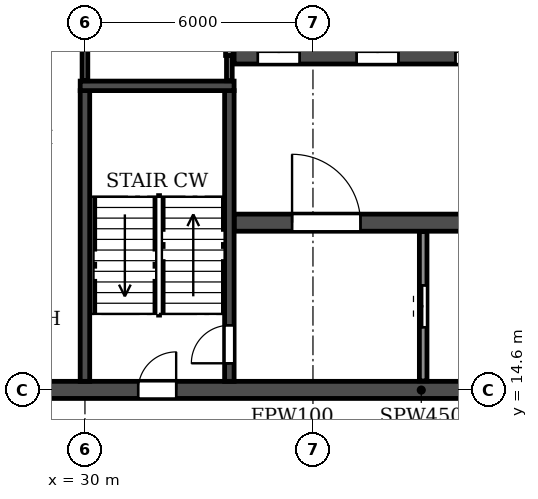
"""IFC4 building model, lengths in metres.
Left out: names, types, materials, properties, quantities, classifications, styles, units other than length and angle.
Written with IfcOpenShell. Run it as: python <this file> out.ifc"""

import sys

from ifc_helpers import new_model, si_unit, direction, frame, frame_2d, origin, place, context, subcontext, project, spatial, rectangle, extrude, element, fill, save


model = new_model("IFC4")
c1 = context("Model", 3, precision=1e-05, world=origin(), true_north=direction((0.0, 1.0)))
c2 = subcontext(c1, "Body", "Model", "MODEL_VIEW")
j1 = project(units=[si_unit("LENGTHUNIT", "METRE"), si_unit("PLANEANGLEUNIT", "RADIAN")], contexts=[c1])
p1 = place(None, origin())
s1 = spatial("IfcSite", under=j1, at=p1, CompositionType="ELEMENT")
p2 = place(p1, origin())
s2 = spatial("IfcBuilding", under=s1, at=p2, CompositionType="ELEMENT")
p3 = place(p2, frame((0.0, 0.0, 162.0)))
s3 = spatial("IfcBuildingStorey", under=s2, at=p3, CompositionType="ELEMENT", Elevation=162.0)
p4 = place(p3, frame((18.2, 14.6, 0.0), z_axis=(0.0, 0.0, 1.0), x_axis=(1.0, 0.0, 0.0)))
e1 = element("IfcWall", 1, at=p4, inside=s3, PredefinedType="SOLIDWALL", context=c2, shape_type="SweptSolid", body=[
    extrude(rectangle(XDim=65.6, YDim=0.45, at=frame_2d((32.8, 0.0))), origin(), (0.0, 0.0, 1.0), 2.95),
])
p5 = place(p4, frame((0.7, 0.0, 0.0)))
e2 = element("IfcOpeningElement", 2, at=p5, cuts=e1, PredefinedType="OPENING", context=c2, shape_type="SweptSolid", body=[
    extrude(rectangle(XDim=1.0, YDim=2.1, at=frame_2d((0.5, 1.05))), frame((0.0, 0.235, 0.0), z_axis=(0.0, -1.0, 0.0), x_axis=(1.0, 0.0, 0.0)), (0.0, 0.0, 1.0), 0.47),
])
p6 = place(p4, frame((8.6, 0.0, 0.0)))
e3 = element("IfcOpeningElement", 3, at=p6, cuts=e1, PredefinedType="OPENING", context=c2, shape_type="SweptSolid", body=[
    extrude(rectangle(XDim=1.0, YDim=2.1, at=frame_2d((0.5, 1.05))), frame((0.0, 0.235, 0.0), z_axis=(0.0, -1.0, 0.0), x_axis=(1.0, 0.0, 0.0)), (0.0, 0.0, 1.0), 0.47),
])
p7 = place(p4, frame((13.2, 0.0, 0.0)))
e4 = element("IfcOpeningElement", 4, at=p7, cuts=e1, PredefinedType="OPENING", context=c2, shape_type="SweptSolid", body=[
    extrude(rectangle(XDim=1.0, YDim=2.1, at=frame_2d((0.5, 1.05))), frame((0.0, 0.235, 0.0), z_axis=(0.0, -1.0, 0.0), x_axis=(1.0, 0.0, 0.0)), (0.0, 0.0, 1.0), 0.47),
])
p8 = place(p4, frame((27.1, 0.0, 0.0)))
e5 = element("IfcOpeningElement", 5, at=p8, cuts=e1, PredefinedType="OPENING", context=c2, shape_type="SweptSolid", body=[
    extrude(rectangle(XDim=1.0, YDim=2.1, at=frame_2d((0.5, 1.05))), frame((0.0, 0.235, 0.0), z_axis=(0.0, -1.0, 0.0), x_axis=(1.0, 0.0, 0.0)), (0.0, 0.0, 1.0), 0.47),
])
p9 = place(p4, frame((32.3, 0.0, 0.0)))
e6 = element("IfcOpeningElement", 6, at=p9, cuts=e1, PredefinedType="OPENING", context=c2, shape_type="SweptSolid", body=[
    extrude(rectangle(XDim=1.0, YDim=2.1, at=frame_2d((0.5, 1.05))), frame((0.0, 0.235, 0.0), z_axis=(0.0, -1.0, 0.0), x_axis=(1.0, 0.0, 0.0)), (0.0, 0.0, 1.0), 0.47),
])
p10 = place(p4, frame((35.95, 0.0, 0.0)))
e7 = element("IfcOpeningElement", 7, at=p10, cuts=e1, PredefinedType="OPENING", context=c2, shape_type="SweptSolid", body=[
    extrude(rectangle(XDim=1.5, YDim=2.1, at=frame_2d((0.75, 1.05))), frame((0.0, 0.235, 0.0), z_axis=(0.0, -1.0, 0.0), x_axis=(1.0, 0.0, 0.0)), (0.0, 0.0, 1.0), 0.47),
])
p11 = place(p4, frame((40.1, 0.0, 0.0)))
e8 = element("IfcOpeningElement", 8, at=p11, cuts=e1, PredefinedType="OPENING", context=c2, shape_type="SweptSolid", body=[
    extrude(rectangle(XDim=1.0, YDim=2.1, at=frame_2d((0.5, 1.05))), frame((0.0, 0.235, 0.0), z_axis=(0.0, -1.0, 0.0), x_axis=(1.0, 0.0, 0.0)), (0.0, 0.0, 1.0), 0.47),
])
p12 = place(p4, frame((51.4, 0.0, 0.0)))
e9 = element("IfcOpeningElement", 9, at=p12, cuts=e1, PredefinedType="OPENING", context=c2, shape_type="SweptSolid", body=[
    extrude(rectangle(XDim=1.0, YDim=2.1, at=frame_2d((0.5, 1.05))), frame((0.0, 0.235, 0.0), z_axis=(0.0, -1.0, 0.0), x_axis=(1.0, 0.0, 0.0)), (0.0, 0.0, 1.0), 0.47),
])
p13 = place(p4, frame((56.0, 0.0, 0.0)))
e10 = element("IfcOpeningElement", 10, at=p13, cuts=e1, PredefinedType="OPENING", context=c2, shape_type="SweptSolid", body=[
    extrude(rectangle(XDim=1.0, YDim=2.1, at=frame_2d((0.5, 1.05))), frame((0.0, 0.235, 0.0), z_axis=(0.0, -1.0, 0.0), x_axis=(1.0, 0.0, 0.0)), (0.0, 0.0, 1.0), 0.47),
])
p14 = place(p4, frame((63.9, 0.0, 0.0)))
e11 = element("IfcOpeningElement", 11, at=p14, cuts=e1, PredefinedType="OPENING", context=c2, shape_type="SweptSolid", body=[
    extrude(rectangle(XDim=1.0, YDim=2.1, at=frame_2d((0.5, 1.05))), frame((0.0, 0.235, 0.0), z_axis=(0.0, -1.0, 0.0), x_axis=(1.0, 0.0, 0.0)), (0.0, 0.0, 1.0), 0.47),
])
p15 = place(p3, frame((33.925, 19.0, 0.0), z_axis=(0.0, 0.0, 1.0), x_axis=(1.0, 0.0, 0.0)))
e12 = element("IfcWall", 12, at=p15, inside=s3, PredefinedType="SOLIDWALL", context=c2, shape_type="SweptSolid", body=[
    extrude(rectangle(XDim=34.15, YDim=0.45, at=frame_2d((17.075, 0.0))), origin(), (0.0, 0.0, 1.0), 2.95),
])
p16 = place(p15, frame((16.175, 0.0, 0.0)))
e13 = element("IfcOpeningElement", 13, at=p16, cuts=e12, PredefinedType="OPENING", context=c2, shape_type="SweptSolid", body=[
    extrude(rectangle(XDim=1.8, YDim=2.1, at=frame_2d((0.9, 1.05))), frame((0.0, 0.235, 0.0), z_axis=(0.0, -1.0, 0.0), x_axis=(1.0, 0.0, 0.0)), (0.0, 0.0, 1.0), 0.47),
])
p17 = place(p15, frame((1.525, 0.0, 0.0)))
e14 = element("IfcOpeningElement", 14, at=p17, cuts=e12, PredefinedType="OPENING", context=c2, shape_type="SweptSolid", body=[
    extrude(rectangle(XDim=1.8, YDim=2.1, at=frame_2d((0.9, 1.05))), frame((0.0, 0.235, 0.0), z_axis=(0.0, -1.0, 0.0), x_axis=(1.0, 0.0, 0.0)), (0.0, 0.0, 1.0), 0.47),
])
p18 = place(p15, frame((30.825, 0.0, 0.0)))
e15 = element("IfcOpeningElement", 15, at=p18, cuts=e12, PredefinedType="OPENING", context=c2, shape_type="SweptSolid", body=[
    extrude(rectangle(XDim=1.8, YDim=2.1, at=frame_2d((0.9, 1.05))), frame((0.0, 0.235, 0.0), z_axis=(0.0, -1.0, 0.0), x_axis=(1.0, 0.0, 0.0)), (0.0, 0.0, 1.0), 0.47),
])
p19 = place(p3, frame((33.925, 23.4, 0.0), z_axis=(0.0, 0.0, 1.0), x_axis=(1.0, 0.0, 0.0)))
e16 = element("IfcWall", 16, at=p19, inside=s3, PredefinedType="SOLIDWALL", context=c2, shape_type="SweptSolid", body=[
    extrude(rectangle(XDim=34.15, YDim=0.45, at=frame_2d((17.075, 0.0))), origin(), (0.0, 0.0, 1.0), 2.95),
])
p20 = place(p19, frame((16.175, 0.0, 0.0)))
e17 = element("IfcOpeningElement", 17, at=p20, cuts=e16, PredefinedType="OPENING", context=c2, shape_type="SweptSolid", body=[
    extrude(rectangle(XDim=1.8, YDim=2.1, at=frame_2d((0.9, 1.05))), frame((0.0, 0.235, 0.0), z_axis=(0.0, -1.0, 0.0), x_axis=(1.0, 0.0, 0.0)), (0.0, 0.0, 1.0), 0.47),
])
p21 = place(p19, frame((0.625, 0.0, 0.0)))
e18 = element("IfcOpeningElement", 18, at=p21, cuts=e16, PredefinedType="OPENING", context=c2, shape_type="SweptSolid", body=[
    extrude(rectangle(XDim=1.1, YDim=2.1, at=frame_2d((0.55, 1.05))), frame((0.0, 0.235, 0.0), z_axis=(0.0, -1.0, 0.0), x_axis=(1.0, 0.0, 0.0)), (0.0, 0.0, 1.0), 0.47),
])
p22 = place(p19, frame((3.225, 0.0, 0.0)))
e19 = element("IfcOpeningElement", 19, at=p22, cuts=e16, PredefinedType="OPENING", context=c2, shape_type="SweptSolid", body=[
    extrude(rectangle(XDim=1.1, YDim=2.1, at=frame_2d((0.55, 1.05))), frame((0.0, 0.235, 0.0), z_axis=(0.0, -1.0, 0.0), x_axis=(1.0, 0.0, 0.0)), (0.0, 0.0, 1.0), 0.47),
])
p23 = place(p19, frame((5.825, 0.0, 0.0)))
e20 = element("IfcOpeningElement", 20, at=p23, cuts=e16, PredefinedType="OPENING", context=c2, shape_type="SweptSolid", body=[
    extrude(rectangle(XDim=1.1, YDim=2.1, at=frame_2d((0.55, 1.05))), frame((0.0, 0.235, 0.0), z_axis=(0.0, -1.0, 0.0), x_axis=(1.0, 0.0, 0.0)), (0.0, 0.0, 1.0), 0.47),
])
p24 = place(p19, frame((8.425, 0.0, 0.0)))
e21 = element("IfcOpeningElement", 21, at=p24, cuts=e16, PredefinedType="OPENING", context=c2, shape_type="SweptSolid", body=[
    extrude(rectangle(XDim=1.1, YDim=2.1, at=frame_2d((0.55, 1.05))), frame((0.0, 0.235, 0.0), z_axis=(0.0, -1.0, 0.0), x_axis=(1.0, 0.0, 0.0)), (0.0, 0.0, 1.0), 0.47),
])
p25 = place(p19, frame((11.025, 0.0, 0.0)))
e22 = element("IfcOpeningElement", 22, at=p25, cuts=e16, PredefinedType="OPENING", context=c2, shape_type="SweptSolid", body=[
    extrude(rectangle(XDim=1.1, YDim=2.1, at=frame_2d((0.55, 1.05))), frame((0.0, 0.235, 0.0), z_axis=(0.0, -1.0, 0.0), x_axis=(1.0, 0.0, 0.0)), (0.0, 0.0, 1.0), 0.47),
])
p26 = place(p19, frame((13.625, 0.0, 0.0)))
e23 = element("IfcOpeningElement", 23, at=p26, cuts=e16, PredefinedType="OPENING", context=c2, shape_type="SweptSolid", body=[
    extrude(rectangle(XDim=1.1, YDim=2.1, at=frame_2d((0.55, 1.05))), frame((0.0, 0.235, 0.0), z_axis=(0.0, -1.0, 0.0), x_axis=(1.0, 0.0, 0.0)), (0.0, 0.0, 1.0), 0.47),
])
p27 = place(p19, frame((27.225, 0.0, 0.0)))
e24 = element("IfcOpeningElement", 24, at=p27, cuts=e16, PredefinedType="OPENING", context=c2, shape_type="SweptSolid", body=[
    extrude(rectangle(XDim=1.1, YDim=2.1, at=frame_2d((0.55, 1.05))), frame((0.0, 0.235, 0.0), z_axis=(0.0, -1.0, 0.0), x_axis=(1.0, 0.0, 0.0)), (0.0, 0.0, 1.0), 0.47),
])
p28 = place(p3, frame((30.0, 14.825, 0.0), z_axis=(0.0, 0.0, 1.0), x_axis=(0.0, 1.0, 0.0)))
e25 = element("IfcWall", 25, at=p28, inside=s3, PredefinedType="SOLIDWALL", context=c2, shape_type="SweptSolid", body=[
    extrude(rectangle(XDim=7.65, YDim=0.25, at=frame_2d((3.825, 0.0))), origin(), (0.0, 0.0, 1.0), 2.95),
])
p29 = place(p3, frame((33.8, 14.825, 0.0), z_axis=(0.0, 0.0, 1.0), x_axis=(0.0, 1.0, 0.0)))
e26 = element("IfcWall", 26, at=p29, inside=s3, PredefinedType="SOLIDWALL", context=c2, shape_type="SweptSolid", body=[
    extrude(rectangle(XDim=7.65, YDim=0.25, at=frame_2d((3.825, 0.0))), origin(), (0.0, 0.0, 1.0), 2.95),
])
p30 = place(p29, frame((0.475, 0.0, 0.0)))
e27 = element("IfcOpeningElement", 27, at=p30, cuts=e26, PredefinedType="OPENING", context=c2, shape_type="SweptSolid", body=[
    extrude(rectangle(XDim=1.0, YDim=2.1, at=frame_2d((0.5, 1.05))), frame((0.0, 0.135, 0.0), z_axis=(0.0, -1.0, 0.0), x_axis=(1.0, 0.0, 0.0)), (0.0, 0.0, 1.0), 0.27),
])
p31 = place(p3, frame((29.875, 22.6, 0.0), z_axis=(0.0, 0.0, 1.0), x_axis=(1.0, 0.0, 0.0)))
e28 = element("IfcWall", 28, at=p31, inside=s3, PredefinedType="SOLIDWALL", context=c2, shape_type="SweptSolid", body=[
    extrude(rectangle(XDim=4.05, YDim=0.25, at=frame_2d((2.025, 0.0))), origin(), (0.0, 0.0, 1.0), 2.95),
])
p32 = place(p3, frame((30.0, 22.735, 0.0), z_axis=(0.0, 0.0, 1.0), x_axis=(0.0, 1.0, 0.0)))
e29 = element("IfcWall", 29, at=p32, inside=s3, PredefinedType="PARTITIONING", context=c2, shape_type="SweptSolid", body=[
    extrude(rectangle(XDim=4.83, YDim=0.15, at=frame_2d((2.415, 0.0))), origin(), (0.0, 0.0, 1.0), 2.95),
])
p33 = place(p3, frame((33.8, 22.735, 0.0), z_axis=(0.0, 0.0, 1.0), x_axis=(0.0, 1.0, 0.0)))
e30 = element("IfcWall", 30, at=p33, inside=s3, PredefinedType="PARTITIONING", context=c2, shape_type="SweptSolid", body=[
    extrude(rectangle(XDim=0.665, YDim=0.15, at=frame_2d((0.333, 0.0))), origin(), (0.0, 0.0, 1.0), 2.95),
])
p34 = place(p3, frame((33.8, 23.4, 0.0), z_axis=(0.0, 0.0, 1.0), x_axis=(0.0, 1.0, 0.0)))
e31 = element("IfcWall", 31, at=p34, inside=s3, PredefinedType="PARTITIONING", context=c2, shape_type="SweptSolid", body=[
    extrude(rectangle(XDim=2.7, YDim=0.2, at=frame_2d((1.35, 0.0))), origin(), (0.0, 0.0, 1.0), 2.95),
])
p35 = place(p3, frame((38.9, 14.835, 0.0), z_axis=(0.0, 0.0, 1.0), x_axis=(0.0, 1.0, 0.0)))
e32 = element("IfcWall", 32, at=p35, inside=s3, PredefinedType="PARTITIONING", context=c2, shape_type="SweptSolid", body=[
    extrude(rectangle(XDim=3.93, YDim=0.2, at=frame_2d((1.965, 0.0))), origin(), (0.0, 0.0, 1.0), 2.95),
])
p36 = place(p35, frame((1.415, 0.0, 0.0)))
e33 = element("IfcOpeningElement", 33, at=p36, cuts=e32, PredefinedType="OPENING", context=c2, shape_type="SweptSolid", body=[
    extrude(rectangle(XDim=1.1, YDim=2.1, at=frame_2d((0.55, 1.05))), frame((0.0, 0.11, 0.0), z_axis=(0.0, -1.0, 0.0), x_axis=(1.0, 0.0, 0.0)), (0.0, 0.0, 1.0), 0.22),
])
p37 = place(p7, origin())
e34 = element("IfcDoor", 34, at=p37, inside=s3, OperationType="SINGLE_SWING_RIGHT", PredefinedType="DOOR", context=c2, shape_type="SweptSolid", body=[
    extrude(rectangle(XDim=1.0, YDim=2.1, at=frame_2d((0.5, 1.05))), frame((0.0, 0.025, 0.0), z_axis=(0.0, -1.0, 0.0), x_axis=(1.0, 0.0, 0.0)), (0.0, 0.0, 1.0), 0.05),
])
fill(e4, e34)
p38 = place(p30, origin())
e35 = element("IfcDoor", 35, at=p38, inside=s3, OperationType="SINGLE_SWING_LEFT", PredefinedType="DOOR", context=c2, shape_type="SweptSolid", body=[
    extrude(rectangle(XDim=1.0, YDim=2.1, at=frame_2d((0.5, 1.05))), frame((0.0, 0.025, 0.0), z_axis=(0.0, -1.0, 0.0), x_axis=(1.0, 0.0, 0.0)), (0.0, 0.0, 1.0), 0.05),
])
fill(e27, e35)
p39 = place(p36, origin())
e36 = element("IfcDoor", 36, at=p39, inside=s3, OperationType="DOUBLE_DOOR_SLIDING", PredefinedType="DOOR", context=c2, shape_type="SweptSolid", body=[
    extrude(rectangle(XDim=1.1, YDim=2.1, at=frame_2d((0.55, 1.05))), frame((0.0, 0.025, 0.0), z_axis=(0.0, -1.0, 0.0), x_axis=(1.0, 0.0, 0.0)), (0.0, 0.0, 1.0), 0.05),
])
fill(e33, e36)
p40 = place(p21, origin())
e37 = element("IfcDoor", 37, at=p40, inside=s3, OperationType="DOUBLE_DOOR_SLIDING", PredefinedType="DOOR", context=c2, shape_type="SweptSolid", body=[
    extrude(rectangle(XDim=1.1, YDim=2.1, at=frame_2d((0.55, 1.05))), frame((0.0, 0.025, 0.0), z_axis=(0.0, -1.0, 0.0), x_axis=(1.0, 0.0, 0.0)), (0.0, 0.0, 1.0), 0.05),
])
fill(e18, e37)
p41 = place(p17, origin())
e38 = element("IfcDoor", 38, at=p41, inside=s3, OperationType="DOUBLE_DOOR_SINGLE_SWING", PredefinedType="DOOR", context=c2, shape_type="SweptSolid", body=[
    extrude(rectangle(XDim=1.8, YDim=2.1, at=frame_2d((0.9, 1.05))), frame((0.0, 0.025, 0.0), z_axis=(0.0, -1.0, 0.0), x_axis=(1.0, 0.0, 0.0)), (0.0, 0.0, 1.0), 0.05),
])
fill(e14, e38)
p42 = place(p22, origin())
e39 = element("IfcDoor", 39, at=p42, inside=s3, OperationType="DOUBLE_DOOR_SLIDING", PredefinedType="DOOR", context=c2, shape_type="SweptSolid", body=[
    extrude(rectangle(XDim=1.1, YDim=2.1, at=frame_2d((0.55, 1.05))), frame((0.0, 0.025, 0.0), z_axis=(0.0, -1.0, 0.0), x_axis=(1.0, 0.0, 0.0)), (0.0, 0.0, 1.0), 0.05),
])
fill(e19, e39)
p43 = place(p23, origin())
e40 = element("IfcDoor", 40, at=p43, inside=s3, OperationType="DOUBLE_DOOR_SLIDING", PredefinedType="DOOR", context=c2, shape_type="SweptSolid", body=[
    extrude(rectangle(XDim=1.1, YDim=2.1, at=frame_2d((0.55, 1.05))), frame((0.0, 0.025, 0.0), z_axis=(0.0, -1.0, 0.0), x_axis=(1.0, 0.0, 0.0)), (0.0, 0.0, 1.0), 0.05),
])
fill(e20, e40)
save(model, sys.argv[1])
